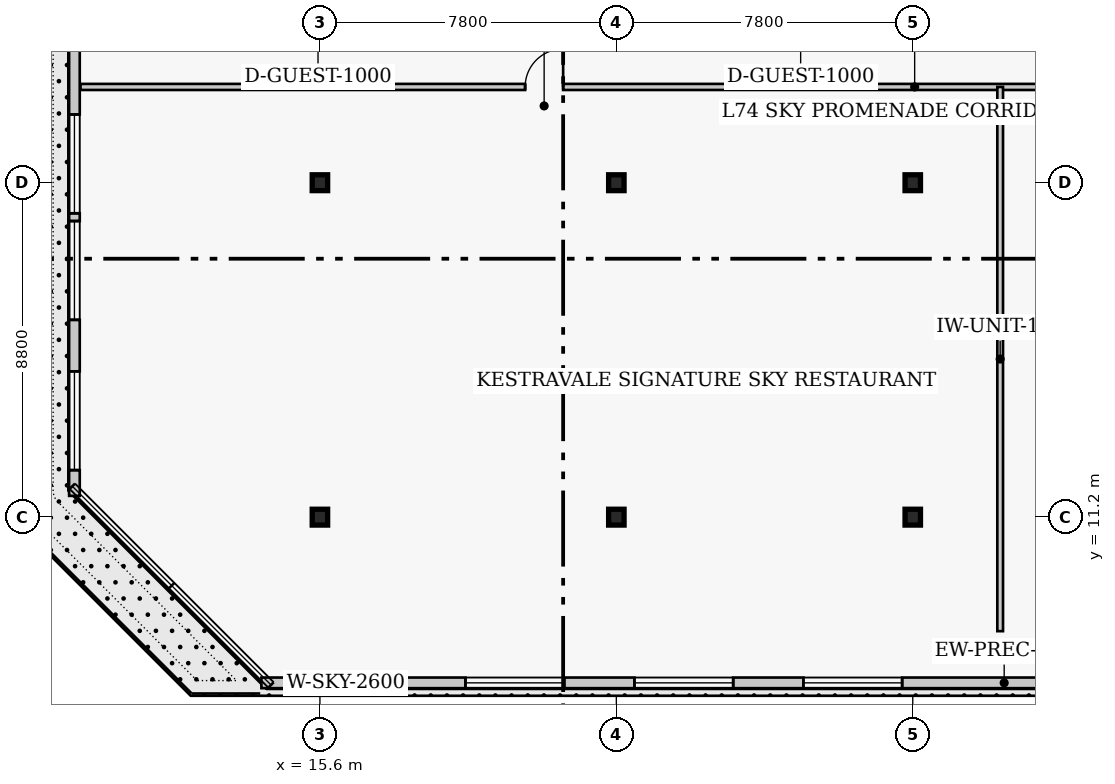
"""IFC4 building model, lengths in metres.
Left out: names, types, materials, properties, quantities, classifications, styles, units other than length and angle.
Written with IfcOpenShell. Run it as: python <this file> out.ifc"""

import sys

from ifc_helpers import new_model, si_unit, direction, frame, frame_2d, origin, origin_2d, place, context, subcontext, project, spatial, rectangle, i_section, extrude, element, fill, save


model = new_model("IFC4")
c1 = context("Model", 3, precision=1e-05, world=origin(), true_north=direction((0.0, 1.0)))
c2 = subcontext(c1, "Body", "Model", "MODEL_VIEW")
j1 = project(units=[si_unit("LENGTHUNIT", "METRE"), si_unit("PLANEANGLEUNIT", "RADIAN")], contexts=[c1])
p1 = place(None, origin())
s1 = spatial("IfcSite", under=j1, at=p1, CompositionType="ELEMENT")
p2 = place(p1, origin())
s2 = spatial("IfcBuilding", under=s1, at=p2, CompositionType="ELEMENT")
p3 = place(p2, frame((0.0, 0.0, 297.4)))
s3 = spatial("IfcBuildingStorey", under=s2, at=p3, CompositionType="ELEMENT", Elevation=297.4)
for number, where, z_axis, x_axis in (
    (1, (15.6, 11.2, 0.0), (0.0, 0.0, 1.0), (1.0, 0.0, 0.0)),
    (2, (15.6, 20.0, 0.0), (0.0, 0.0, 1.0), (1.0, 0.0, 0.0)),
    (3, (23.4, 11.2, 0.0), (0.0, 0.0, 1.0), (1.0, 0.0, 0.0)),
    (4, (23.4, 20.0, 0.0), (0.0, 0.0, 1.0), (1.0, 0.0, 0.0)),
    (5, (31.2, 11.2, 0.0), (0.0, 0.0, 1.0), (1.0, 0.0, 0.0)),
    (6, (31.2, 20.0, 0.0), (0.0, 0.0, 1.0), (1.0, 0.0, 0.0)),
):
    element("IfcColumn", number, at=place(p3, frame(where, z_axis=z_axis, x_axis=x_axis)), inside=s3, PredefinedType="COLUMN", context=c2, shape_type="SweptSolid", body=[
        extrude(i_section(OverallWidth=0.406, OverallDepth=0.417, WebThickness=0.03, FlangeThickness=0.048, FilletRadius=0.017, at=origin_2d()), origin(), (0.0, 0.0, 1.0), 4.6),
    ])
p4 = place(p3, frame((14.06, 6.84, 0.0), z_axis=(0.0, 0.0, 1.0), x_axis=(1.0, 0.0, 0.0)))
e7 = element("IfcWall", 7, at=p4, inside=s3, PredefinedType="SOLIDWALL", context=c2, shape_type="SweptSolid", body=[
    extrude(rectangle(XDim=22.23, YDim=0.28, at=frame_2d((11.115, 0.0))), origin(), (0.0, 0.0, 1.0), 4.31),
])
p5 = place(p4, frame((0.923, 0.0, 0.65)))
e8 = element("IfcOpeningElement", 8, at=p5, cuts=e7, PredefinedType="OPENING", context=c2, shape_type="SweptSolid", body=[
    extrude(rectangle(XDim=2.6, YDim=2.2, at=frame_2d((1.3, 1.1))), frame((0.0, 0.15, 0.0), z_axis=(0.0, -1.0, 0.0), x_axis=(1.0, 0.0, 0.0)), (0.0, 0.0, 1.0), 0.3),
])
p6 = place(p4, frame((5.369, 0.0, 0.65)))
e9 = element("IfcOpeningElement", 9, at=p6, cuts=e7, PredefinedType="OPENING", context=c2, shape_type="SweptSolid", body=[
    extrude(rectangle(XDim=2.6, YDim=2.2, at=frame_2d((1.3, 1.1))), frame((0.0, 0.15, 0.0), z_axis=(0.0, -1.0, 0.0), x_axis=(1.0, 0.0, 0.0)), (0.0, 0.0, 1.0), 0.3),
])
p7 = place(p4, frame((9.815, 0.0, 0.65)))
e10 = element("IfcOpeningElement", 10, at=p7, cuts=e7, PredefinedType="OPENING", context=c2, shape_type="SweptSolid", body=[
    extrude(rectangle(XDim=2.6, YDim=2.2, at=frame_2d((1.3, 1.1))), frame((0.0, 0.15, 0.0), z_axis=(0.0, -1.0, 0.0), x_axis=(1.0, 0.0, 0.0)), (0.0, 0.0, 1.0), 0.3),
])
p8 = place(p4, frame((14.261, 0.0, 0.65)))
e11 = element("IfcOpeningElement", 11, at=p8, cuts=e7, PredefinedType="OPENING", context=c2, shape_type="SweptSolid", body=[
    extrude(rectangle(XDim=2.6, YDim=2.2, at=frame_2d((1.3, 1.1))), frame((0.0, 0.15, 0.0), z_axis=(0.0, -1.0, 0.0), x_axis=(1.0, 0.0, 0.0)), (0.0, 0.0, 1.0), 0.3),
])
p9 = place(p3, frame((9.14, 39.44, 0.0), z_axis=(0.0, 0.0, 1.0), x_axis=(0.0, -1.0, 0.0)))
e12 = element("IfcWall", 12, at=p9, inside=s3, PredefinedType="SOLIDWALL", context=c2, shape_type="SweptSolid", body=[
    extrude(rectangle(XDim=27.68, YDim=0.28, at=frame_2d((13.84, 0.0))), origin(), (0.0, 0.0, 1.0), 4.31),
])
p10 = place(p9, frame((0.677, 0.0, 0.65)))
e13 = element("IfcOpeningElement", 13, at=p10, cuts=e12, PredefinedType="OPENING", context=c2, shape_type="SweptSolid", body=[
    extrude(rectangle(XDim=2.6, YDim=2.2, at=frame_2d((1.3, 1.1))), frame((0.0, 0.15, 0.0), z_axis=(0.0, -1.0, 0.0), x_axis=(1.0, 0.0, 0.0)), (0.0, 0.0, 1.0), 0.3),
])
p11 = place(p9, frame((4.631, 0.0, 0.65)))
e14 = element("IfcOpeningElement", 14, at=p11, cuts=e12, PredefinedType="OPENING", context=c2, shape_type="SweptSolid", body=[
    extrude(rectangle(XDim=2.6, YDim=2.2, at=frame_2d((1.3, 1.1))), frame((0.0, 0.15, 0.0), z_axis=(0.0, -1.0, 0.0), x_axis=(1.0, 0.0, 0.0)), (0.0, 0.0, 1.0), 0.3),
])
p12 = place(p9, frame((8.586, 0.0, 0.65)))
e15 = element("IfcOpeningElement", 15, at=p12, cuts=e12, PredefinedType="OPENING", context=c2, shape_type="SweptSolid", body=[
    extrude(rectangle(XDim=2.6, YDim=2.2, at=frame_2d((1.3, 1.1))), frame((0.0, 0.15, 0.0), z_axis=(0.0, -1.0, 0.0), x_axis=(1.0, 0.0, 0.0)), (0.0, 0.0, 1.0), 0.3),
])
p13 = place(p9, frame((11.39, 0.0, 0.65)))
e16 = element("IfcOpeningElement", 16, at=p13, cuts=e12, PredefinedType="OPENING", context=c2, shape_type="SweptSolid", body=[
    extrude(rectangle(XDim=2.6, YDim=2.2, at=frame_2d((1.3, 1.1))), frame((0.0, 0.15, 0.0), z_axis=(0.0, -1.0, 0.0), x_axis=(1.0, 0.0, 0.0)), (0.0, 0.0, 1.0), 0.3),
])
p14 = place(p9, frame((17.644, 0.0, 0.65)))
e17 = element("IfcOpeningElement", 17, at=p14, cuts=e12, PredefinedType="OPENING", context=c2, shape_type="SweptSolid", body=[
    extrude(rectangle(XDim=2.6, YDim=2.2, at=frame_2d((1.3, 1.1))), frame((0.0, 0.15, 0.0), z_axis=(0.0, -1.0, 0.0), x_axis=(1.0, 0.0, 0.0)), (0.0, 0.0, 1.0), 0.3),
])
p15 = place(p9, frame((20.448, 0.0, 0.65)))
e18 = element("IfcOpeningElement", 18, at=p15, cuts=e12, PredefinedType="OPENING", context=c2, shape_type="SweptSolid", body=[
    extrude(rectangle(XDim=2.6, YDim=2.2, at=frame_2d((1.3, 1.1))), frame((0.0, 0.15, 0.0), z_axis=(0.0, -1.0, 0.0), x_axis=(1.0, 0.0, 0.0)), (0.0, 0.0, 1.0), 0.3),
])
p16 = place(p9, frame((24.403, 0.0, 0.65)))
e19 = element("IfcOpeningElement", 19, at=p16, cuts=e12, PredefinedType="OPENING", context=c2, shape_type="SweptSolid", body=[
    extrude(rectangle(XDim=2.6, YDim=2.2, at=frame_2d((1.3, 1.1))), frame((0.0, 0.15, 0.0), z_axis=(0.0, -1.0, 0.0), x_axis=(1.0, 0.0, 0.0)), (0.0, 0.0, 1.0), 0.3),
])
p17 = place(p3, frame((9.3, 22.52, 0.0), z_axis=(0.0, 0.0, 1.0), x_axis=(1.0, 0.0, 0.0)))
e20 = element("IfcWall", 20, at=p17, inside=s3, PredefinedType="PARTITIONING", context=c2, shape_type="SweptSolid", body=[
    extrude(rectangle(XDim=59.4, YDim=0.16, at=frame_2d((29.7, 0.0))), origin(), (0.0, 0.0, 1.0), 4.31),
])
p18 = place(p17, frame((11.7, 0.0, 0.0)))
e21 = element("IfcOpeningElement", 21, at=p18, cuts=e20, PredefinedType="OPENING", context=c2, shape_type="SweptSolid", body=[
    extrude(rectangle(XDim=1.0, YDim=2.15, at=frame_2d((0.5, 1.075))), frame((0.0, 0.09, 0.0), z_axis=(0.0, -1.0, 0.0), x_axis=(1.0, 0.0, 0.0)), (0.0, 0.0, 1.0), 0.18),
])
p19 = place(p17, frame((31.2, 0.0, 0.0)))
e22 = element("IfcOpeningElement", 22, at=p19, cuts=e20, PredefinedType="OPENING", context=c2, shape_type="SweptSolid", body=[
    extrude(rectangle(XDim=1.0, YDim=2.15, at=frame_2d((0.5, 1.075))), frame((0.0, 0.09, 0.0), z_axis=(0.0, -1.0, 0.0), x_axis=(1.0, 0.0, 0.0)), (0.0, 0.0, 1.0), 0.18),
])
p20 = place(p17, frame((48.7, 0.0, 0.0)))
e23 = element("IfcOpeningElement", 23, at=p20, cuts=e20, PredefinedType="OPENING", context=c2, shape_type="SweptSolid", body=[
    extrude(rectangle(XDim=1.0, YDim=2.15, at=frame_2d((0.5, 1.075))), frame((0.0, 0.09, 0.0), z_axis=(0.0, -1.0, 0.0), x_axis=(1.0, 0.0, 0.0)), (0.0, 0.0, 1.0), 0.18),
])
p21 = place(p3, frame((33.5, 8.2, 0.0), z_axis=(0.0, 0.0, 1.0), x_axis=(0.0, 1.0, 0.0)))
e24 = element("IfcWall", 24, at=p21, inside=s3, PredefinedType="PARTITIONING", context=c2, shape_type="SweptSolid", body=[
    extrude(rectangle(XDim=14.32, YDim=0.15, at=frame_2d((7.16, 0.0))), origin(), (0.0, 0.0, 1.0), 4.31),
])
p22 = place(p5, origin())
e25 = element("IfcWindow", 25, at=p22, inside=s3, PartitioningType="SINGLE_PANEL", PredefinedType="WINDOW", context=c2, shape_type="SweptSolid", body=[
    extrude(rectangle(XDim=2.6, YDim=2.2, at=frame_2d((1.3, 1.1))), frame((0.0, 0.03, 0.0), z_axis=(0.0, -1.0, 0.0), x_axis=(1.0, 0.0, 0.0)), (0.0, 0.0, 1.0), 0.06),
])
fill(e8, e25)
p23 = place(p6, origin())
e26 = element("IfcWindow", 26, at=p23, inside=s3, PartitioningType="SINGLE_PANEL", PredefinedType="WINDOW", context=c2, shape_type="SweptSolid", body=[
    extrude(rectangle(XDim=2.6, YDim=2.2, at=frame_2d((1.3, 1.1))), frame((0.0, 0.03, 0.0), z_axis=(0.0, -1.0, 0.0), x_axis=(1.0, 0.0, 0.0)), (0.0, 0.0, 1.0), 0.06),
])
fill(e9, e26)
p24 = place(p7, origin())
e27 = element("IfcWindow", 27, at=p24, inside=s3, PartitioningType="SINGLE_PANEL", PredefinedType="WINDOW", context=c2, shape_type="SweptSolid", body=[
    extrude(rectangle(XDim=2.6, YDim=2.2, at=frame_2d((1.3, 1.1))), frame((0.0, 0.03, 0.0), z_axis=(0.0, -1.0, 0.0), x_axis=(1.0, 0.0, 0.0)), (0.0, 0.0, 1.0), 0.06),
])
fill(e10, e27)
p25 = place(p8, origin())
e28 = element("IfcWindow", 28, at=p25, inside=s3, PartitioningType="SINGLE_PANEL", PredefinedType="WINDOW", context=c2, shape_type="SweptSolid", body=[
    extrude(rectangle(XDim=2.6, YDim=2.2, at=frame_2d((1.3, 1.1))), frame((0.0, 0.03, 0.0), z_axis=(0.0, -1.0, 0.0), x_axis=(1.0, 0.0, 0.0)), (0.0, 0.0, 1.0), 0.06),
])
fill(e11, e28)
p26 = place(p14, origin())
e29 = element("IfcWindow", 29, at=p26, inside=s3, PartitioningType="SINGLE_PANEL", PredefinedType="WINDOW", context=c2, shape_type="SweptSolid", body=[
    extrude(rectangle(XDim=2.6, YDim=2.2, at=frame_2d((1.3, 1.1))), frame((0.0, 0.03, 0.0), z_axis=(0.0, -1.0, 0.0), x_axis=(1.0, 0.0, 0.0)), (0.0, 0.0, 1.0), 0.06),
])
fill(e17, e29)
p27 = place(p15, origin())
e30 = element("IfcWindow", 30, at=p27, inside=s3, PartitioningType="SINGLE_PANEL", PredefinedType="WINDOW", context=c2, shape_type="SweptSolid", body=[
    extrude(rectangle(XDim=2.6, YDim=2.2, at=frame_2d((1.3, 1.1))), frame((0.0, 0.03, 0.0), z_axis=(0.0, -1.0, 0.0), x_axis=(1.0, 0.0, 0.0)), (0.0, 0.0, 1.0), 0.06),
])
fill(e18, e30)
p28 = place(p16, origin())
e31 = element("IfcWindow", 31, at=p28, inside=s3, PartitioningType="SINGLE_PANEL", PredefinedType="WINDOW", context=c2, shape_type="SweptSolid", body=[
    extrude(rectangle(XDim=2.6, YDim=2.2, at=frame_2d((1.3, 1.1))), frame((0.0, 0.03, 0.0), z_axis=(0.0, -1.0, 0.0), x_axis=(1.0, 0.0, 0.0)), (0.0, 0.0, 1.0), 0.06),
])
fill(e19, e31)
p29 = place(p18, origin())
e32 = element("IfcDoor", 32, at=p29, inside=s3, OperationType="SINGLE_SWING_RIGHT", PredefinedType="DOOR", context=c2, shape_type="SweptSolid", body=[
    extrude(rectangle(XDim=1.0, YDim=2.15, at=frame_2d((0.5, 1.075))), frame((0.0, 0.025, 0.0), z_axis=(0.0, -1.0, 0.0), x_axis=(1.0, 0.0, 0.0)), (0.0, 0.0, 1.0), 0.05),
])
fill(e21, e32)
save(model, sys.argv[1])
